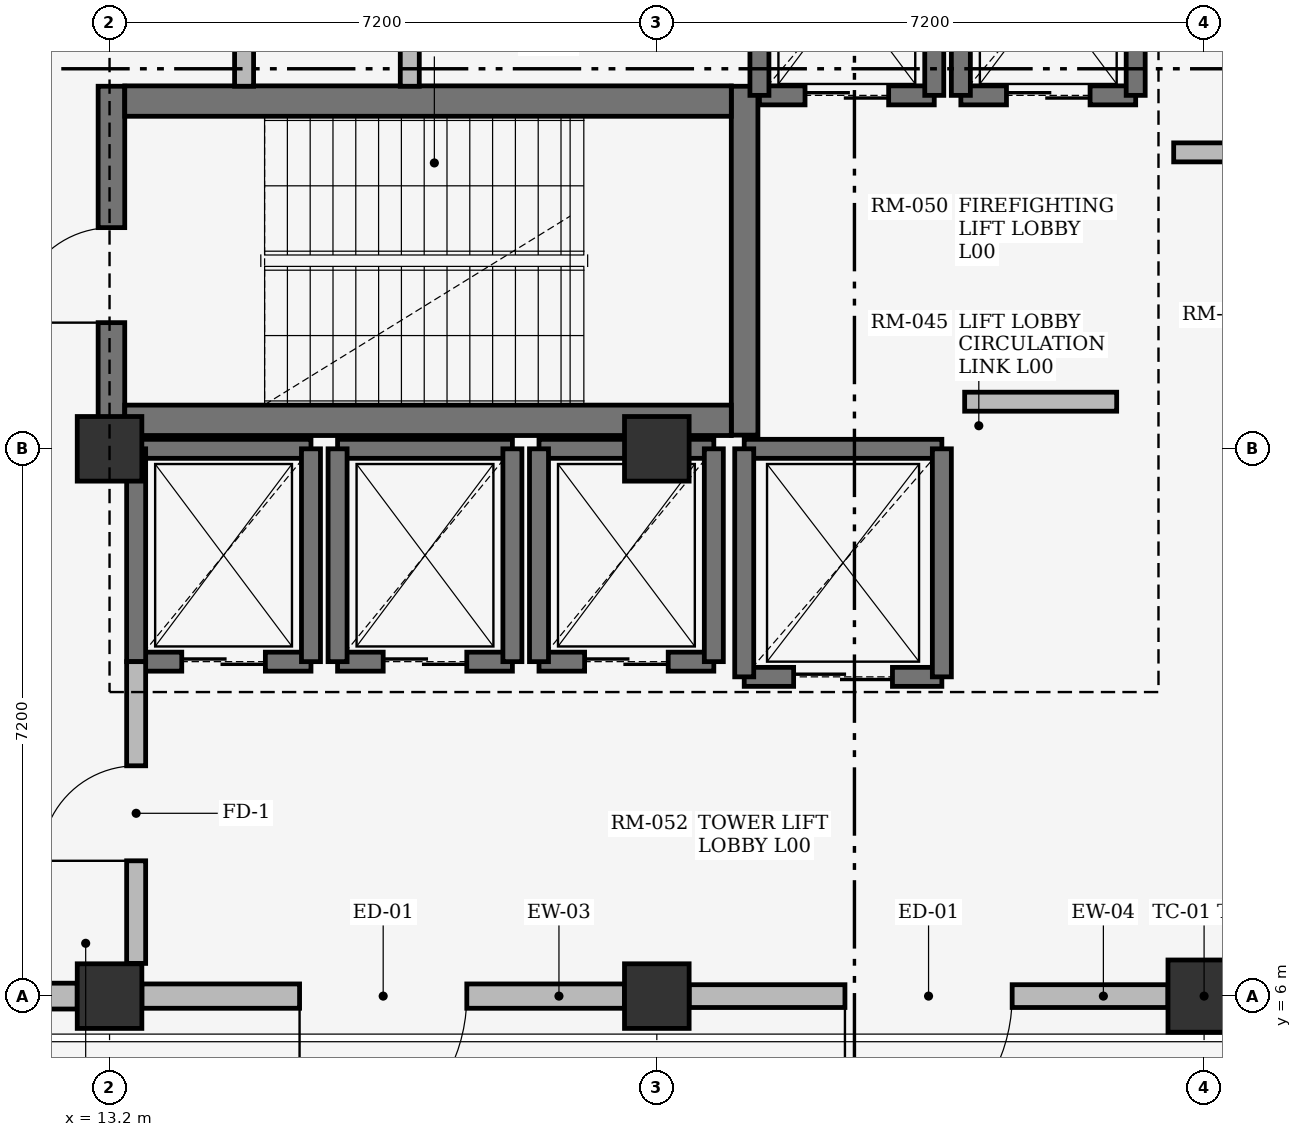
"""IFC4 building model, lengths in metres.
Left out: names, types, materials, properties, quantities, classifications, styles, units other than length and angle.
Written with IfcOpenShell. Run it as: python <this file> out.ifc"""

import sys

from ifc_helpers import new_model, si_unit, direction, frame, frame_2d, origin, origin_2d, place, context, subcontext, project, spatial, rectangle, extrude, element, fill, save


model = new_model("IFC4")
c1 = context("Model", 3, precision=1e-05, world=origin(), true_north=direction((0.0, 1.0)))
c2 = subcontext(c1, "Body", "Model", "MODEL_VIEW")
j1 = project(units=[si_unit("LENGTHUNIT", "METRE"), si_unit("PLANEANGLEUNIT", "RADIAN")], contexts=[c1])
p1 = place(None, origin())
s1 = spatial("IfcSite", under=j1, at=p1, CompositionType="ELEMENT")
p2 = place(p1, origin())
s2 = spatial("IfcBuilding", under=s1, at=p2, CompositionType="ELEMENT")
p3 = place(p2, origin())
s3 = spatial("IfcBuildingStorey", under=s2, at=p3, CompositionType="ELEMENT", Elevation=0.0)
for number, where, z_axis, x_axis in (
    (1, (13.2, 6.0, 0.0), (0.0, 0.0, 1.0), (1.0, 0.0, 0.0)),
    (2, (13.2, 13.2, 0.0), (0.0, 0.0, 1.0), (1.0, 0.0, 0.0)),
    (3, (20.4, 6.0, 0.0), (0.0, 0.0, 1.0), (1.0, 0.0, 0.0)),
    (4, (20.4, 13.2, 0.0), (0.0, 0.0, 1.0), (1.0, 0.0, 0.0)),
):
    element("IfcColumn", number, at=place(p3, frame(where, z_axis=z_axis, x_axis=x_axis)), inside=s3, PredefinedType="COLUMN", context=c2, shape_type="SweptSolid", body=[
        extrude(rectangle(XDim=0.85, YDim=0.85, at=origin_2d()), origin(), (0.0, 0.0, 1.0), 4.48),
    ])
p4 = place(p3, frame((27.6, 6.0, 0.0), z_axis=(0.0, 0.0, 1.0), x_axis=(1.0, 0.0, 0.0)))
e5 = element("IfcColumn", 5, at=p4, inside=s3, PredefinedType="COLUMN", context=c2, shape_type="SweptSolid", body=[
    extrude(rectangle(XDim=0.95, YDim=0.95, at=origin_2d()), origin(), (0.0, 0.0, 1.0), 4.48),
])
p5 = place(p3, frame((6.425, 6.0, 0.0), z_axis=(0.0, 0.0, 1.0), x_axis=(1.0, 0.0, 0.0)))
e6 = element("IfcWall", 6, at=p5, inside=s3, PredefinedType="STANDARD", context=c2, shape_type="SweptSolid", body=[
    extrude(rectangle(XDim=6.35, YDim=0.34, at=frame_2d((3.175, 0.0))), origin(), (0.0, 0.0, 1.0), 3.66),
])
p6 = place(p5, frame((4.425, 0.0, 0.0)))
e7 = element("IfcOpeningElement", 7, at=p6, cuts=e6, PredefinedType="OPENING", context=c2, shape_type="SweptSolid", body=[
    extrude(rectangle(XDim=1.2, YDim=2.15, at=frame_2d((0.6, 1.075))), frame((0.0, 0.18, 0.0), z_axis=(0.0, -1.0, 0.0), x_axis=(1.0, 0.0, 0.0)), (0.0, 0.0, 1.0), 0.36),
])
p7 = place(p3, frame((13.625, 6.0, 0.0), z_axis=(0.0, 0.0, 1.0), x_axis=(1.0, 0.0, 0.0)))
e8 = element("IfcWall", 8, at=p7, inside=s3, PredefinedType="STANDARD", context=c2, shape_type="SweptSolid", body=[
    extrude(rectangle(XDim=6.35, YDim=0.32, at=frame_2d((3.175, 0.0))), origin(), (0.0, 0.0, 1.0), 3.66),
])
p8 = place(p7, frame((2.075, 0.0, 0.0)))
e9 = element("IfcOpeningElement", 9, at=p8, cuts=e8, PredefinedType="OPENING", context=c2, shape_type="SweptSolid", body=[
    extrude(rectangle(XDim=2.2, YDim=2.4, at=frame_2d((1.1, 1.2))), frame((0.0, 0.17, 0.0), z_axis=(0.0, -1.0, 0.0), x_axis=(1.0, 0.0, 0.0)), (0.0, 0.0, 1.0), 0.34),
])
p9 = place(p3, frame((20.825, 6.0, 0.0), z_axis=(0.0, 0.0, 1.0), x_axis=(1.0, 0.0, 0.0)))
e10 = element("IfcWall", 10, at=p9, inside=s3, PredefinedType="STANDARD", context=c2, shape_type="SweptSolid", body=[
    extrude(rectangle(XDim=6.3, YDim=0.3, at=frame_2d((3.15, 0.0))), origin(), (0.0, 0.0, 1.0), 3.66),
])
p10 = place(p9, frame((2.05, 0.0, 0.0)))
e11 = element("IfcOpeningElement", 11, at=p10, cuts=e10, PredefinedType="OPENING", context=c2, shape_type="SweptSolid", body=[
    extrude(rectangle(XDim=2.2, YDim=2.4, at=frame_2d((1.1, 1.2))), frame((0.0, 0.16, 0.0), z_axis=(0.0, -1.0, 0.0), x_axis=(1.0, 0.0, 0.0)), (0.0, 0.0, 1.0), 0.32),
])
p11 = place(p3, frame((13.225, 13.0, 0.0), z_axis=(0.0, 0.0, 1.0), x_axis=(0.0, 1.0, 0.0)))
e12 = element("IfcWall", 12, at=p11, inside=s3, PredefinedType="SHEAR", context=c2, shape_type="SweptSolid", body=[
    extrude(rectangle(XDim=4.97, YDim=0.35, at=frame_2d((2.485, 0.0))), origin(), (0.0, 0.0, 1.0), 4.48),
])
p12 = place(p11, frame((1.86, 0.0, 0.0)))
e13 = element("IfcOpeningElement", 13, at=p12, cuts=e12, PredefinedType="OPENING", context=c2, shape_type="SweptSolid", body=[
    extrude(rectangle(XDim=1.25, YDim=2.2, at=frame_2d((0.625, 1.1))), frame((0.0, 0.185, 0.0), z_axis=(0.0, -1.0, 0.0), x_axis=(1.0, 0.0, 0.0)), (0.0, 0.0, 1.0), 0.37),
])
p13 = place(p3, frame((21.555, 13.38, 0.0), z_axis=(0.0, 0.0, 1.0), x_axis=(0.0, 1.0, 0.0)))
e14 = element("IfcWall", 14, at=p13, inside=s3, PredefinedType="SHEAR", context=c2, shape_type="SweptSolid", body=[
    extrude(rectangle(XDim=4.59, YDim=0.35, at=frame_2d((2.295, 0.0))), origin(), (0.0, 0.0, 1.0), 4.48),
])
for number, where, z_axis, x_axis in (
    (15, (13.4, 13.575, 0.0), (0.0, 0.0, 1.0), (1.0, 0.0, 0.0)),
    (16, (13.4, 17.775, 0.0), (0.0, 0.0, 1.0), (1.0, 0.0, 0.0)),
):
    element("IfcWall", number, at=place(p3, frame(where, z_axis=z_axis, x_axis=x_axis)), inside=s3, PredefinedType="SHEAR", context=c2, shape_type="SweptSolid", body=[
        extrude(rectangle(XDim=7.98, YDim=0.4, at=frame_2d((3.99, 0.0))), origin(), (0.0, 0.0, 1.0), 4.48),
    ])
p14 = place(p3, frame((21.75, 17.85, 0.0), z_axis=(0.0, 0.0, 1.0), x_axis=(1.0, 0.0, 0.0)))
e17 = element("IfcWall", 17, at=p14, inside=s3, PredefinedType="SHEAR", context=c2, shape_type="SweptSolid", body=[
    extrude(rectangle(XDim=2.3, YDim=0.25, at=frame_2d((1.15, 0.0))), origin(), (0.0, 0.0, 1.0), 4.48),
])
p15 = place(p14, frame((0.6, 0.0, 0.0)))
e18 = element("IfcOpeningElement", 18, at=p15, cuts=e17, PredefinedType="OPENING", context=c2, shape_type="SweptSolid", body=[
    extrude(rectangle(XDim=1.1, YDim=2.2, at=frame_2d((0.55, 1.1))), frame((0.0, 0.135, 0.0), z_axis=(0.0, -1.0, 0.0), x_axis=(1.0, 0.0, 0.0)), (0.0, 0.0, 1.0), 0.27),
])
for number, where, z_axis, x_axis in (
    (19, (21.75, 17.85, 0.0), (0.0, 0.0, 1.0), (0.0, 1.0, 0.0)),
    (20, (24.05, 17.85, 0.0), (0.0, 0.0, 1.0), (0.0, 1.0, 0.0)),
):
    element("IfcWall", number, at=place(p3, frame(where, z_axis=z_axis, x_axis=x_axis)), inside=s3, PredefinedType="SHEAR", context=c2, shape_type="SweptSolid", body=[
        extrude(rectangle(XDim=2.7, YDim=0.25, at=frame_2d((1.35, 0.0))), origin(), (0.0, 0.0, 1.0), 4.48),
    ])
p16 = place(p3, frame((24.4, 17.85, 0.0), z_axis=(0.0, 0.0, 1.0), x_axis=(1.0, 0.0, 0.0)))
e21 = element("IfcWall", 21, at=p16, inside=s3, PredefinedType="SHEAR", context=c2, shape_type="SweptSolid", body=[
    extrude(rectangle(XDim=2.3, YDim=0.25, at=frame_2d((1.15, 0.0))), origin(), (0.0, 0.0, 1.0), 4.48),
])
p17 = place(p16, frame((0.6, 0.0, 0.0)))
e22 = element("IfcOpeningElement", 22, at=p17, cuts=e21, PredefinedType="OPENING", context=c2, shape_type="SweptSolid", body=[
    extrude(rectangle(XDim=1.1, YDim=2.2, at=frame_2d((0.55, 1.1))), frame((0.0, 0.135, 0.0), z_axis=(0.0, -1.0, 0.0), x_axis=(1.0, 0.0, 0.0)), (0.0, 0.0, 1.0), 0.27),
])
for number, where, z_axis, x_axis in (
    (23, (24.4, 17.85, 0.0), (0.0, 0.0, 1.0), (0.0, 1.0, 0.0)),
    (24, (26.7, 17.85, 0.0), (0.0, 0.0, 1.0), (0.0, 1.0, 0.0)),
):
    element("IfcWall", number, at=place(p3, frame(where, z_axis=z_axis, x_axis=x_axis)), inside=s3, PredefinedType="SHEAR", context=c2, shape_type="SweptSolid", body=[
        extrude(rectangle(XDim=2.7, YDim=0.25, at=frame_2d((1.35, 0.0))), origin(), (0.0, 0.0, 1.0), 4.48),
    ])
p18 = place(p3, frame((13.55, 10.4, 0.0), z_axis=(0.0, 0.0, 1.0), x_axis=(1.0, 0.0, 0.0)))
e25 = element("IfcWall", 25, at=p18, inside=s3, PredefinedType="SHEAR", context=c2, shape_type="SweptSolid", body=[
    extrude(rectangle(XDim=2.3, YDim=0.25, at=frame_2d((1.15, 0.0))), origin(), (0.0, 0.0, 1.0), 4.48),
])
p19 = place(p18, frame((0.6, 0.0, 0.0)))
e26 = element("IfcOpeningElement", 26, at=p19, cuts=e25, PredefinedType="OPENING", context=c2, shape_type="SweptSolid", body=[
    extrude(rectangle(XDim=1.1, YDim=2.2, at=frame_2d((0.55, 1.1))), frame((0.0, 0.135, 0.0), z_axis=(0.0, -1.0, 0.0), x_axis=(1.0, 0.0, 0.0)), (0.0, 0.0, 1.0), 0.27),
])
p20 = place(p3, frame((13.55, 13.2, 0.0), z_axis=(0.0, 0.0, 1.0), x_axis=(1.0, 0.0, 0.0)))
e27 = element("IfcWall", 27, at=p20, inside=s3, PredefinedType="SHEAR", context=c2, shape_type="SweptSolid", body=[
    extrude(rectangle(XDim=2.3, YDim=0.25, at=frame_2d((1.15, 0.0))), origin(), (0.0, 0.0, 1.0), 4.48),
])
for number, where, z_axis, x_axis in (
    (28, (13.55, 10.4, 0.0), (0.0, 0.0, 1.0), (0.0, 1.0, 0.0)),
    (29, (15.85, 10.4, 0.0), (0.0, 0.0, 1.0), (0.0, 1.0, 0.0)),
):
    element("IfcWall", number, at=place(p3, frame(where, z_axis=z_axis, x_axis=x_axis)), inside=s3, PredefinedType="SHEAR", context=c2, shape_type="SweptSolid", body=[
        extrude(rectangle(XDim=2.8, YDim=0.25, at=frame_2d((1.4, 0.0))), origin(), (0.0, 0.0, 1.0), 4.48),
    ])
p21 = place(p3, frame((16.2, 10.4, 0.0), z_axis=(0.0, 0.0, 1.0), x_axis=(1.0, 0.0, 0.0)))
e30 = element("IfcWall", 30, at=p21, inside=s3, PredefinedType="SHEAR", context=c2, shape_type="SweptSolid", body=[
    extrude(rectangle(XDim=2.3, YDim=0.25, at=frame_2d((1.15, 0.0))), origin(), (0.0, 0.0, 1.0), 4.48),
])
p22 = place(p21, frame((0.6, 0.0, 0.0)))
e31 = element("IfcOpeningElement", 31, at=p22, cuts=e30, PredefinedType="OPENING", context=c2, shape_type="SweptSolid", body=[
    extrude(rectangle(XDim=1.1, YDim=2.2, at=frame_2d((0.55, 1.1))), frame((0.0, 0.135, 0.0), z_axis=(0.0, -1.0, 0.0), x_axis=(1.0, 0.0, 0.0)), (0.0, 0.0, 1.0), 0.27),
])
p23 = place(p3, frame((16.2, 13.2, 0.0), z_axis=(0.0, 0.0, 1.0), x_axis=(1.0, 0.0, 0.0)))
e32 = element("IfcWall", 32, at=p23, inside=s3, PredefinedType="SHEAR", context=c2, shape_type="SweptSolid", body=[
    extrude(rectangle(XDim=2.3, YDim=0.25, at=frame_2d((1.15, 0.0))), origin(), (0.0, 0.0, 1.0), 4.48),
])
for number, where, z_axis, x_axis in (
    (33, (16.2, 10.4, 0.0), (0.0, 0.0, 1.0), (0.0, 1.0, 0.0)),
    (34, (18.5, 10.4, 0.0), (0.0, 0.0, 1.0), (0.0, 1.0, 0.0)),
):
    element("IfcWall", number, at=place(p3, frame(where, z_axis=z_axis, x_axis=x_axis)), inside=s3, PredefinedType="SHEAR", context=c2, shape_type="SweptSolid", body=[
        extrude(rectangle(XDim=2.8, YDim=0.25, at=frame_2d((1.4, 0.0))), origin(), (0.0, 0.0, 1.0), 4.48),
    ])
p24 = place(p3, frame((18.85, 10.4, 0.0), z_axis=(0.0, 0.0, 1.0), x_axis=(1.0, 0.0, 0.0)))
e35 = element("IfcWall", 35, at=p24, inside=s3, PredefinedType="SHEAR", context=c2, shape_type="SweptSolid", body=[
    extrude(rectangle(XDim=2.3, YDim=0.25, at=frame_2d((1.15, 0.0))), origin(), (0.0, 0.0, 1.0), 4.48),
])
p25 = place(p24, frame((0.6, 0.0, 0.0)))
e36 = element("IfcOpeningElement", 36, at=p25, cuts=e35, PredefinedType="OPENING", context=c2, shape_type="SweptSolid", body=[
    extrude(rectangle(XDim=1.1, YDim=2.2, at=frame_2d((0.55, 1.1))), frame((0.0, 0.135, 0.0), z_axis=(0.0, -1.0, 0.0), x_axis=(1.0, 0.0, 0.0)), (0.0, 0.0, 1.0), 0.27),
])
p26 = place(p3, frame((18.85, 13.2, 0.0), z_axis=(0.0, 0.0, 1.0), x_axis=(1.0, 0.0, 0.0)))
e37 = element("IfcWall", 37, at=p26, inside=s3, PredefinedType="SHEAR", context=c2, shape_type="SweptSolid", body=[
    extrude(rectangle(XDim=2.3, YDim=0.25, at=frame_2d((1.15, 0.0))), origin(), (0.0, 0.0, 1.0), 4.48),
])
for number, where, z_axis, x_axis in (
    (38, (18.85, 10.4, 0.0), (0.0, 0.0, 1.0), (0.0, 1.0, 0.0)),
    (39, (21.15, 10.4, 0.0), (0.0, 0.0, 1.0), (0.0, 1.0, 0.0)),
):
    element("IfcWall", number, at=place(p3, frame(where, z_axis=z_axis, x_axis=x_axis)), inside=s3, PredefinedType="SHEAR", context=c2, shape_type="SweptSolid", body=[
        extrude(rectangle(XDim=2.8, YDim=0.25, at=frame_2d((1.4, 0.0))), origin(), (0.0, 0.0, 1.0), 4.48),
    ])
p27 = place(p3, frame((21.55, 10.2, 0.0), z_axis=(0.0, 0.0, 1.0), x_axis=(1.0, 0.0, 0.0)))
e40 = element("IfcWall", 40, at=p27, inside=s3, PredefinedType="SHEAR", context=c2, shape_type="SweptSolid", body=[
    extrude(rectangle(XDim=2.6, YDim=0.25, at=frame_2d((1.3, 0.0))), origin(), (0.0, 0.0, 1.0), 4.48),
])
p28 = place(p27, frame((0.65, 0.0, 0.0)))
e41 = element("IfcOpeningElement", 41, at=p28, cuts=e40, PredefinedType="OPENING", context=c2, shape_type="SweptSolid", body=[
    extrude(rectangle(XDim=1.3, YDim=2.25, at=frame_2d((0.65, 1.125))), frame((0.0, 0.135, 0.0), z_axis=(0.0, -1.0, 0.0), x_axis=(1.0, 0.0, 0.0)), (0.0, 0.0, 1.0), 0.27),
])
p29 = place(p3, frame((21.55, 13.2, 0.0), z_axis=(0.0, 0.0, 1.0), x_axis=(1.0, 0.0, 0.0)))
e42 = element("IfcWall", 42, at=p29, inside=s3, PredefinedType="SHEAR", context=c2, shape_type="SweptSolid", body=[
    extrude(rectangle(XDim=2.6, YDim=0.25, at=frame_2d((1.3, 0.0))), origin(), (0.0, 0.0, 1.0), 4.48),
])
for number, where, z_axis, x_axis in (
    (43, (21.55, 10.2, 0.0), (0.0, 0.0, 1.0), (0.0, 1.0, 0.0)),
    (44, (24.15, 10.2, 0.0), (0.0, 0.0, 1.0), (0.0, 1.0, 0.0)),
):
    element("IfcWall", number, at=place(p3, frame(where, z_axis=z_axis, x_axis=x_axis)), inside=s3, PredefinedType="SHEAR", context=c2, shape_type="SweptSolid", body=[
        extrude(rectangle(XDim=3.0, YDim=0.25, at=frame_2d((1.5, 0.0))), origin(), (0.0, 0.0, 1.0), 4.48),
    ])
p30 = place(p3, frame((24.45, 13.82, 0.0), z_axis=(0.0, 0.0, 1.0), x_axis=(1.0, 0.0, 0.0)))
e45 = element("IfcWall", 45, at=p30, inside=s3, PredefinedType="SOLIDWALL", context=c2, shape_type="SweptSolid", body=[
    extrude(rectangle(XDim=2.0, YDim=0.25, at=frame_2d((1.0, 0.0))), origin(), (0.0, 0.0, 1.0), 4.46),
])
p31 = place(p3, frame((27.2, 17.1, 0.0), z_axis=(0.0, 0.0, 1.0), x_axis=(1.0, 0.0, 0.0)))
e46 = element("IfcWall", 46, at=p31, inside=s3, PredefinedType="SOLIDWALL", context=c2, shape_type="SweptSolid", body=[
    extrude(rectangle(XDim=14.25, YDim=0.25, at=frame_2d((7.125, 0.0))), origin(), (0.0, 0.0, 1.0), 4.46),
])
p32 = place(p31, frame((6.225, 0.0, 0.0)))
e47 = element("IfcOpeningElement", 47, at=p32, cuts=e46, PredefinedType="OPENING", context=c2, shape_type="SweptSolid", body=[
    extrude(rectangle(XDim=1.8, YDim=2.25, at=frame_2d((0.9, 1.125))), frame((0.0, 0.135, 0.0), z_axis=(0.0, -1.0, 0.0), x_axis=(1.0, 0.0, 0.0)), (0.0, 0.0, 1.0), 0.27),
])
p33 = place(p3, frame((13.55, 6.43, 0.0), z_axis=(0.0, 0.0, 1.0), x_axis=(0.0, 1.0, 0.0)))
e48 = element("IfcWall", 48, at=p33, inside=s3, PredefinedType="SOLIDWALL", context=c2, shape_type="SweptSolid", body=[
    extrude(rectangle(XDim=3.97, YDim=0.25, at=frame_2d((1.985, 0.0))), origin(), (0.0, 0.0, 1.0), 4.46),
])
p34 = place(p33, frame((1.35, 0.0, 0.0)))
e49 = element("IfcOpeningElement", 49, at=p34, cuts=e48, PredefinedType="OPENING", context=c2, shape_type="SweptSolid", body=[
    extrude(rectangle(XDim=1.25, YDim=2.2, at=frame_2d((0.625, 1.1))), frame((0.0, 0.135, 0.0), z_axis=(0.0, -1.0, 0.0), x_axis=(1.0, 0.0, 0.0)), (0.0, 0.0, 1.0), 0.27),
])
p35 = place(p3, frame((17.15, 17.97, 0.0), z_axis=(0.0, 0.0, 1.0), x_axis=(0.0, 1.0, 0.0)))
e50 = element("IfcWall", 50, at=p35, inside=s3, PredefinedType="SOLIDWALL", context=c2, shape_type="SweptSolid", body=[
    extrude(rectangle(XDim=9.105, YDim=0.25, at=frame_2d((4.552, 0.0))), origin(), (0.0, 0.0, 1.0), 4.46),
])
p36 = place(p35, frame((7.03, 0.0, 0.0)))
e51 = element("IfcOpeningElement", 51, at=p36, cuts=e50, PredefinedType="OPENING", context=c2, shape_type="SweptSolid", body=[
    extrude(rectangle(XDim=1.25, YDim=2.2, at=frame_2d((0.625, 1.1))), frame((0.0, 0.135, 0.0), z_axis=(0.0, -1.0, 0.0), x_axis=(1.0, 0.0, 0.0)), (0.0, 0.0, 1.0), 0.27),
])
p37 = place(p3, frame((14.97, 17.97, 0.0), z_axis=(0.0, 0.0, 1.0), x_axis=(0.0, 1.0, 0.0)))
e52 = element("IfcWall", 52, at=p37, inside=s3, PredefinedType="SOLIDWALL", context=c2, shape_type="SweptSolid", body=[
    extrude(rectangle(XDim=1.99, YDim=0.25, at=frame_2d((0.995, 0.0))), origin(), (0.0, 0.0, 1.0), 4.46),
])
p38 = place(p8, frame((2.2, 0.0, 0.0), z_axis=(0.0, 0.0, 1.0), x_axis=(-1.0, 0.0, 0.0)))
e53 = element("IfcDoor", 53, at=p38, inside=s3, OperationType="DOUBLE_DOOR_SINGLE_SWING", PredefinedType="DOOR", context=c2, shape_type="SweptSolid", body=[
    extrude(rectangle(XDim=2.2, YDim=2.4, at=frame_2d((1.1, 1.2))), frame((0.0, 0.025, 0.0), z_axis=(0.0, -1.0, 0.0), x_axis=(1.0, 0.0, 0.0)), (0.0, 0.0, 1.0), 0.05),
])
fill(e9, e53)
p39 = place(p10, frame((2.2, 0.0, 0.0), z_axis=(0.0, 0.0, 1.0), x_axis=(-1.0, 0.0, 0.0)))
e54 = element("IfcDoor", 54, at=p39, inside=s3, OperationType="DOUBLE_DOOR_SINGLE_SWING", PredefinedType="DOOR", context=c2, shape_type="SweptSolid", body=[
    extrude(rectangle(XDim=2.2, YDim=2.4, at=frame_2d((1.1, 1.2))), frame((0.0, 0.025, 0.0), z_axis=(0.0, -1.0, 0.0), x_axis=(1.0, 0.0, 0.0)), (0.0, 0.0, 1.0), 0.05),
])
fill(e11, e54)
p40 = place(p12, origin())
e55 = element("IfcDoor", 55, at=p40, inside=s3, OperationType="SINGLE_SWING_LEFT", PredefinedType="DOOR", context=c2, shape_type="SweptSolid", body=[
    extrude(rectangle(XDim=1.25, YDim=2.2, at=frame_2d((0.625, 1.1))), frame((0.0, 0.025, 0.0), z_axis=(0.0, -1.0, 0.0), x_axis=(1.0, 0.0, 0.0)), (0.0, 0.0, 1.0), 0.05),
])
fill(e13, e55)
p41 = place(p15, origin())
e56 = element("IfcDoor", 56, at=p41, inside=s3, OperationType="DOUBLE_DOOR_SLIDING", PredefinedType="DOOR", context=c2, shape_type="SweptSolid", body=[
    extrude(rectangle(XDim=1.1, YDim=2.2, at=frame_2d((0.55, 1.1))), frame((0.0, 0.025, 0.0), z_axis=(0.0, -1.0, 0.0), x_axis=(1.0, 0.0, 0.0)), (0.0, 0.0, 1.0), 0.05),
])
fill(e18, e56)
p42 = place(p17, origin())
e57 = element("IfcDoor", 57, at=p42, inside=s3, OperationType="DOUBLE_DOOR_SLIDING", PredefinedType="DOOR", context=c2, shape_type="SweptSolid", body=[
    extrude(rectangle(XDim=1.1, YDim=2.2, at=frame_2d((0.55, 1.1))), frame((0.0, 0.025, 0.0), z_axis=(0.0, -1.0, 0.0), x_axis=(1.0, 0.0, 0.0)), (0.0, 0.0, 1.0), 0.05),
])
fill(e22, e57)
p43 = place(p19, origin())
e58 = element("IfcDoor", 58, at=p43, inside=s3, OperationType="DOUBLE_DOOR_SLIDING", PredefinedType="DOOR", context=c2, shape_type="SweptSolid", body=[
    extrude(rectangle(XDim=1.1, YDim=2.2, at=frame_2d((0.55, 1.1))), frame((0.0, 0.025, 0.0), z_axis=(0.0, -1.0, 0.0), x_axis=(1.0, 0.0, 0.0)), (0.0, 0.0, 1.0), 0.05),
])
fill(e26, e58)
p44 = place(p22, origin())
e59 = element("IfcDoor", 59, at=p44, inside=s3, OperationType="DOUBLE_DOOR_SLIDING", PredefinedType="DOOR", context=c2, shape_type="SweptSolid", body=[
    extrude(rectangle(XDim=1.1, YDim=2.2, at=frame_2d((0.55, 1.1))), frame((0.0, 0.025, 0.0), z_axis=(0.0, -1.0, 0.0), x_axis=(1.0, 0.0, 0.0)), (0.0, 0.0, 1.0), 0.05),
])
fill(e31, e59)
p45 = place(p25, origin())
e60 = element("IfcDoor", 60, at=p45, inside=s3, OperationType="DOUBLE_DOOR_SLIDING", PredefinedType="DOOR", context=c2, shape_type="SweptSolid", body=[
    extrude(rectangle(XDim=1.1, YDim=2.2, at=frame_2d((0.55, 1.1))), frame((0.0, 0.025, 0.0), z_axis=(0.0, -1.0, 0.0), x_axis=(1.0, 0.0, 0.0)), (0.0, 0.0, 1.0), 0.05),
])
fill(e36, e60)
p46 = place(p28, origin())
e61 = element("IfcDoor", 61, at=p46, inside=s3, OperationType="DOUBLE_DOOR_SLIDING", PredefinedType="DOOR", context=c2, shape_type="SweptSolid", body=[
    extrude(rectangle(XDim=1.3, YDim=2.25, at=frame_2d((0.65, 1.125))), frame((0.0, 0.025, 0.0), z_axis=(0.0, -1.0, 0.0), x_axis=(1.0, 0.0, 0.0)), (0.0, 0.0, 1.0), 0.05),
])
fill(e41, e61)
p47 = place(p34, origin())
e62 = element("IfcDoor", 62, at=p47, inside=s3, OperationType="SINGLE_SWING_LEFT", PredefinedType="DOOR", context=c2, shape_type="SweptSolid", body=[
    extrude(rectangle(XDim=1.25, YDim=2.2, at=frame_2d((0.625, 1.1))), frame((0.0, 0.025, 0.0), z_axis=(0.0, -1.0, 0.0), x_axis=(1.0, 0.0, 0.0)), (0.0, 0.0, 1.0), 0.05),
])
fill(e49, e62)
save(model, sys.argv[1])
